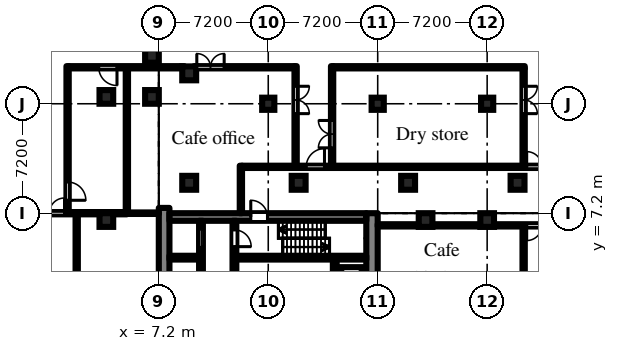
"""IFC4 building model, lengths in metres.
Left out: names, types, materials, properties, quantities, classifications, styles, units other than length and angle.
Written with IfcOpenShell. Run it as: python <this file> out.ifc"""

import sys

from ifc_helpers import new_model, si_unit, direction, frame, frame_2d, origin, origin_2d, place, context, subcontext, project, spatial, rectangle, hollow_circle, extrude, element, fill, save


model = new_model("IFC4")
c1 = context("Model", 3, precision=1e-05, world=origin(), true_north=direction((0.0, 1.0)))
c2 = subcontext(c1, "Body", "Model", "MODEL_VIEW")
j1 = project(units=[si_unit("LENGTHUNIT", "METRE"), si_unit("PLANEANGLEUNIT", "RADIAN")], contexts=[c1])
p1 = place(None, origin())
s1 = spatial("IfcSite", under=j1, at=p1, CompositionType="ELEMENT")
p2 = place(p1, origin())
s2 = spatial("IfcBuilding", under=s1, at=p2, CompositionType="ELEMENT")
p3 = place(p2, origin())
s3 = spatial("IfcBuildingStorey", under=s2, at=p3, CompositionType="ELEMENT", Elevation=0.0)
for number, where, z_axis, x_axis in (
    (1, (3.75, 6.75, 0.0), (0.0, 0.0, 1.0), (1.0, 0.0, 0.0)),
    (2, (3.75, 14.85, 0.0), (0.0, 0.0, 1.0), (1.0, 0.0, 0.0)),
    (3, (6.75, 14.85, 0.0), (0.0, 0.0, 1.0), (1.0, 0.0, 0.0)),
    (4, (6.75, 17.55, 0.0), (0.0, 0.0, 1.0), (1.0, 0.0, 0.0)),
    (5, (24.75, 6.75, 0.0), (0.0, 0.0, 1.0), (1.0, 0.0, 0.0)),
    (6, (28.8, 6.75, 0.0), (0.0, 0.0, 1.0), (1.0, 0.0, 0.0)),
):
    element("IfcColumn", number, at=place(p3, frame(where, z_axis=z_axis, x_axis=x_axis)), inside=s3, PredefinedType="COLUMN", context=c2, shape_type="SweptSolid", body=[
        extrude(rectangle(XDim=0.9, YDim=0.9, at=origin_2d()), origin(), (0.0, 0.0, 1.0), 7.2),
    ])
for number, where, z_axis, x_axis in (
    (7, (14.4, 14.4, 0.0), (0.0, 0.0, 1.0), (1.0, 0.0, 0.0)),
    (8, (21.6, 14.4, 0.0), (0.0, 0.0, 1.0), (1.0, 0.0, 0.0)),
    (9, (28.8, 14.4, 0.0), (0.0, 0.0, 1.0), (1.0, 0.0, 0.0)),
):
    element("IfcColumn", number, at=place(p3, frame(where, z_axis=z_axis, x_axis=x_axis)), inside=s3, PredefinedType="COLUMN", context=c2, shape_type="SweptSolid", body=[
        extrude(rectangle(XDim=0.8, YDim=0.8, at=origin_2d()), origin(), (0.0, 0.0, 1.0), 6.6),
    ])
for number, where, z_axis, x_axis in (
    (10, (30.8, 9.2, 0.0), (0.0, 0.0, 1.0), (1.0, 0.0, 0.0)),
    (11, (23.6, 9.2, 0.0), (0.0, 0.0, 1.0), (1.0, 0.0, 0.0)),
    (12, (16.4, 9.2, 0.0), (0.0, 0.0, 1.0), (1.0, 0.0, 0.0)),
    (13, (9.2, 9.2, 0.0), (0.0, 0.0, 1.0), (1.0, 0.0, 0.0)),
    (14, (9.2, 16.4, 0.0), (0.0, 0.0, 1.0), (1.0, 0.0, 0.0)),
):
    element("IfcColumn", number, at=place(p3, frame(where, z_axis=z_axis, x_axis=x_axis)), inside=s3, PredefinedType="COLUMN", context=c2, shape_type="SweptSolid", body=[
        extrude(hollow_circle(Radius=0.457, WallThickness=0.05, at=origin_2d()), origin(), (0.0, 0.0, 1.0), 7.5),
    ])
p4 = place(p3, frame((7.55, -7.548, 0.0), z_axis=(0.0, 0.0, 1.0), x_axis=(0.0, 1.0, 0.0)))
e15 = element("IfcWall", 15, at=p4, inside=s3, PredefinedType="SHEAR", context=c2, shape_type="SweptSolid", body=[
    extrude(rectangle(XDim=15.096, YDim=0.7, at=frame_2d((7.548, 0.0))), origin(), (0.0, 0.0, 1.0), 6.6),
])
p5 = place(p4, frame((6.348, 0.0, 0.0)))
e16 = element("IfcOpeningElement", 16, at=p5, cuts=e15, PredefinedType="OPENING", context=c2, shape_type="SweptSolid", body=[
    extrude(rectangle(XDim=2.4, YDim=2.2, at=frame_2d((1.2, 1.1))), frame((0.0, 0.36, 0.0), z_axis=(0.0, -1.0, 0.0), x_axis=(1.0, 0.0, 0.0)), (0.0, 0.0, 1.0), 0.72),
])
p6 = place(p3, frame((21.225, -7.2, 0.0), z_axis=(0.0, 0.0, 1.0), x_axis=(0.0, 1.0, 0.0)))
e17 = element("IfcWall", 17, at=p6, inside=s3, PredefinedType="SHEAR", context=c2, shape_type="SweptSolid", body=[
    extrude(rectangle(XDim=14.4, YDim=0.75, at=frame_2d((7.2, 0.0))), origin(), (0.0, 0.0, 1.0), 6.6),
])
p7 = place(p6, frame((6.0, 0.0, 0.0)))
e18 = element("IfcOpeningElement", 18, at=p7, cuts=e17, PredefinedType="OPENING", context=c2, shape_type="SweptSolid", body=[
    extrude(rectangle(XDim=2.4, YDim=2.2, at=frame_2d((1.2, 1.1))), frame((0.0, 0.385, 0.0), z_axis=(0.0, -1.0, 0.0), x_axis=(1.0, 0.0, 0.0)), (0.0, 0.0, 1.0), 0.77),
])
p8 = place(p3, frame((7.9, 6.95, 0.0), z_axis=(0.0, 0.0, 1.0), x_axis=(1.0, 0.0, 0.0)))
e19 = element("IfcWall", 19, at=p8, inside=s3, PredefinedType="SHEAR", context=c2, shape_type="SweptSolid", body=[
    extrude(rectangle(XDim=12.95, YDim=0.5, at=frame_2d((6.475, 0.0))), origin(), (0.0, 0.0, 1.0), 6.6),
])
p9 = place(p8, frame((5.35, 0.0, 0.0)))
e20 = element("IfcOpeningElement", 20, at=p9, cuts=e19, PredefinedType="OPENING", context=c2, shape_type="SweptSolid", body=[
    extrude(rectangle(XDim=1.1, YDim=2.1, at=frame_2d((0.55, 1.05))), frame((0.0, 0.26, 0.0), z_axis=(0.0, -1.0, 0.0), x_axis=(1.0, 0.0, 0.0)), (0.0, 0.0, 1.0), 0.52),
])
p10 = place(p3, frame((7.9, 4.275, 0.0), z_axis=(0.0, 0.0, 1.0), x_axis=(1.0, 0.0, 0.0)))
e21 = element("IfcWall", 21, at=p10, inside=s3, PredefinedType="SHEAR", context=c2, shape_type="SweptSolid", body=[
    extrude(rectangle(XDim=1.95, YDim=0.25, at=frame_2d((0.975, 0.0))), origin(), (0.0, 0.0, 1.0), 6.6),
])
p11 = place(p3, frame((12.3, 4.275, 0.0), z_axis=(0.0, 0.0, 1.0), x_axis=(1.0, 0.0, 0.0)))
e22 = element("IfcWall", 22, at=p11, inside=s3, PredefinedType="SHEAR", context=c2, shape_type="SweptSolid", body=[
    extrude(rectangle(XDim=8.55, YDim=0.25, at=frame_2d((4.275, 0.0))), origin(), (0.0, 0.0, 1.0), 6.6),
])
p12 = place(p3, frame((9.975, 2.05, 0.0), z_axis=(0.0, 0.0, 1.0), x_axis=(0.0, 1.0, 0.0)))
e23 = element("IfcWall", 23, at=p12, inside=s3, PredefinedType="SHEAR", context=c2, shape_type="SweptSolid", body=[
    extrude(rectangle(XDim=4.65, YDim=0.25, at=frame_2d((2.325, 0.0))), origin(), (0.0, 0.0, 1.0), 6.6),
])
p13 = place(p12, frame((2.95, 0.0, 0.0)))
e24 = element("IfcOpeningElement", 24, at=p13, cuts=e23, PredefinedType="OPENING", context=c2, shape_type="SweptSolid", body=[
    extrude(rectangle(XDim=1.1, YDim=2.1, at=frame_2d((0.55, 1.05))), frame((0.0, 0.135, 0.0), z_axis=(0.0, -1.0, 0.0), x_axis=(1.0, 0.0, 0.0)), (0.0, 0.0, 1.0), 0.27),
])
p14 = place(p3, frame((12.175, 2.05, 0.0), z_axis=(0.0, 0.0, 1.0), x_axis=(0.0, 1.0, 0.0)))
e25 = element("IfcWall", 25, at=p14, inside=s3, PredefinedType="SHEAR", context=c2, shape_type="SweptSolid", body=[
    extrude(rectangle(XDim=4.65, YDim=0.25, at=frame_2d((2.325, 0.0))), origin(), (0.0, 0.0, 1.0), 6.6),
])
p15 = place(p14, frame((2.95, 0.0, 0.0)))
e26 = element("IfcOpeningElement", 26, at=p15, cuts=e25, PredefinedType="OPENING", context=c2, shape_type="SweptSolid", body=[
    extrude(rectangle(XDim=1.1, YDim=2.1, at=frame_2d((0.55, 1.05))), frame((0.0, 0.135, 0.0), z_axis=(0.0, -1.0, 0.0), x_axis=(1.0, 0.0, 0.0)), (0.0, 0.0, 1.0), 0.27),
])
p16 = place(p3, frame((18.775, 2.05, 0.0), z_axis=(0.0, 0.0, 1.0), x_axis=(0.0, 1.0, 0.0)))
e27 = element("IfcWall", 27, at=p16, inside=s3, PredefinedType="PARTITIONING", context=c2, shape_type="SweptSolid", body=[
    extrude(rectangle(XDim=2.1, YDim=0.25, at=frame_2d((1.05, 0.0))), origin(), (0.0, 0.0, 1.0), 6.6),
])
p17 = place(p3, frame((-1.8, 7.2, 0.0), z_axis=(0.0, 0.0, 1.0), x_axis=(1.0, 0.0, 0.0)))
e28 = element("IfcWall", 28, at=p17, inside=s3, PredefinedType="PARTITIONING", context=c2, shape_type="SweptSolid", body=[
    extrude(rectangle(XDim=6.9, YDim=0.15, at=frame_2d((3.45, 0.0))), origin(), (0.0, 0.0, 1.0), 6.6),
])
p18 = place(p17, frame((0.8, 0.0, 0.0)))
e29 = element("IfcOpeningElement", 29, at=p18, cuts=e28, PredefinedType="OPENING", context=c2, shape_type="SweptSolid", body=[
    extrude(rectangle(XDim=2.0, YDim=2.1, at=frame_2d((1.0, 1.05))), frame((0.0, 0.085, 0.0), z_axis=(0.0, -1.0, 0.0), x_axis=(1.0, 0.0, 0.0)), (0.0, 0.0, 1.0), 0.17),
])
p19 = place(p3, frame((1.2, 7.275, 0.0), z_axis=(0.0, 0.0, 1.0), x_axis=(0.0, 1.0, 0.0)))
e30 = element("IfcWall", 30, at=p19, inside=s3, PredefinedType="PARTITIONING", context=c2, shape_type="SweptSolid", body=[
    extrude(rectangle(XDim=9.6, YDim=0.15, at=frame_2d((4.8, 0.0))), origin(), (0.0, 0.0, 1.0), 6.6),
])
p20 = place(p19, frame((0.775, 0.0, 0.0)))
e31 = element("IfcOpeningElement", 31, at=p20, cuts=e30, PredefinedType="OPENING", context=c2, shape_type="SweptSolid", body=[
    extrude(rectangle(XDim=1.2, YDim=2.1, at=frame_2d((0.6, 1.05))), frame((0.0, 0.085, 0.0), z_axis=(0.0, -1.0, 0.0), x_axis=(1.0, 0.0, 0.0)), (0.0, 0.0, 1.0), 0.17),
])
p21 = place(p3, frame((1.275, 16.8, 0.0), z_axis=(0.0, 0.0, 1.0), x_axis=(1.0, 0.0, 0.0)))
e32 = element("IfcWall", 32, at=p21, inside=s3, PredefinedType="PARTITIONING", context=c2, shape_type="SweptSolid", body=[
    extrude(rectangle(XDim=7.604, YDim=0.15, at=frame_2d((3.802, 0.0))), origin(), (0.0, 0.0, 1.0), 6.6),
])
p22 = place(p21, frame((1.975, 0.0, 0.0)))
e33 = element("IfcOpeningElement", 33, at=p22, cuts=e32, PredefinedType="OPENING", context=c2, shape_type="SweptSolid", body=[
    extrude(rectangle(XDim=1.2, YDim=2.1, at=frame_2d((0.6, 1.05))), frame((0.0, 0.085, 0.0), z_axis=(0.0, -1.0, 0.0), x_axis=(1.0, 0.0, 0.0)), (0.0, 0.0, 1.0), 0.17),
])
p23 = place(p3, frame((9.521, 16.8, 0.0), z_axis=(0.0, 0.0, 1.0), x_axis=(1.0, 0.0, 0.0)))
e34 = element("IfcWall", 34, at=p23, inside=s3, PredefinedType="PARTITIONING", context=c2, shape_type="SweptSolid", body=[
    extrude(rectangle(XDim=6.604, YDim=0.15, at=frame_2d((3.302, 0.0))), origin(), (0.0, 0.0, 1.0), 6.6),
])
p24 = place(p23, frame((0.178, 0.0, 0.0)))
e35 = element("IfcOpeningElement", 35, at=p24, cuts=e34, PredefinedType="OPENING", context=c2, shape_type="SweptSolid", body=[
    extrude(rectangle(XDim=1.8, YDim=2.1, at=frame_2d((0.9, 1.05))), frame((0.0, 0.085, 0.0), z_axis=(0.0, -1.0, 0.0), x_axis=(1.0, 0.0, 0.0)), (0.0, 0.0, 1.0), 0.17),
])
p25 = place(p3, frame((1.8, 1.725, 0.0), z_axis=(0.0, 0.0, 1.0), x_axis=(0.0, 1.0, 0.0)))
e36 = element("IfcWall", 36, at=p25, inside=s3, PredefinedType="PARTITIONING", context=c2, shape_type="SweptSolid", body=[
    extrude(rectangle(XDim=5.4, YDim=0.15, at=frame_2d((2.7, 0.0))), origin(), (0.0, 0.0, 1.0), 6.6),
])
p26 = place(p25, frame((0.175, 0.0, 0.0)))
e37 = element("IfcOpeningElement", 37, at=p26, cuts=e36, PredefinedType="OPENING", context=c2, shape_type="SweptSolid", body=[
    extrude(rectangle(XDim=0.9, YDim=2.1, at=frame_2d((0.45, 1.05))), frame((0.0, 0.085, 0.0), z_axis=(0.0, -1.0, 0.0), x_axis=(1.0, 0.0, 0.0)), (0.0, 0.0, 1.0), 0.17),
])
p27 = place(p3, frame((5.1, 7.275, 0.0), z_axis=(0.0, 0.0, 1.0), x_axis=(0.0, 1.0, 0.0)))
e38 = element("IfcWall", 38, at=p27, inside=s3, PredefinedType="PARTITIONING", context=c2, shape_type="SweptSolid", body=[
    extrude(rectangle(XDim=9.45, YDim=0.15, at=frame_2d((4.725, 0.0))), origin(), (0.0, 0.0, 1.0), 6.6),
])
p28 = place(p3, frame((5.1, 7.2, 0.0), z_axis=(0.0, 0.0, 1.0), x_axis=(1.0, 0.0, 0.0)))
e39 = element("IfcWall", 39, at=p28, inside=s3, PredefinedType="PARTITIONING", context=c2, shape_type="SweptSolid", body=[
    extrude(rectangle(XDim=2.1, YDim=0.1, at=frame_2d((1.05, 0.0))), origin(), (0.0, 0.0, 1.0), 6.6),
])
p29 = place(p3, frame((12.6, 7.2, 0.0), z_axis=(0.0, 0.0, 1.0), x_axis=(0.0, 1.0, 0.0)))
e40 = element("IfcWall", 40, at=p29, inside=s3, PredefinedType="PARTITIONING", context=c2, shape_type="SweptSolid", body=[
    extrude(rectangle(XDim=3.125, YDim=0.15, at=frame_2d((1.562, 0.0))), origin(), (0.0, 0.0, 1.0), 6.6),
])
p30 = place(p3, frame((12.675, 10.25, 0.0), z_axis=(0.0, 0.0, 1.0), x_axis=(1.0, 0.0, 0.0)))
e41 = element("IfcWall", 41, at=p30, inside=s3, PredefinedType="PARTITIONING", context=c2, shape_type="SweptSolid", body=[
    extrude(rectangle(XDim=37.545, YDim=0.15, at=frame_2d((18.772, 0.0))), origin(), (0.0, 0.0, 1.0), 6.6),
])
p31 = place(p30, frame((4.225, 0.0, 0.0)))
e42 = element("IfcOpeningElement", 42, at=p31, cuts=e41, PredefinedType="OPENING", context=c2, shape_type="SweptSolid", body=[
    extrude(rectangle(XDim=1.2, YDim=2.1, at=frame_2d((0.6, 1.05))), frame((0.0, 0.085, 0.0), z_axis=(0.0, -1.0, 0.0), x_axis=(1.0, 0.0, 0.0)), (0.0, 0.0, 1.0), 0.17),
])
p32 = place(p30, frame((18.725, 0.0, 0.0)))
e43 = element("IfcOpeningElement", 43, at=p32, cuts=e41, PredefinedType="OPENING", context=c2, shape_type="SweptSolid", body=[
    extrude(rectangle(XDim=2.0, YDim=2.1, at=frame_2d((1.0, 1.05))), frame((0.0, 0.085, 0.0), z_axis=(0.0, -1.0, 0.0), x_axis=(1.0, 0.0, 0.0)), (0.0, 0.0, 1.0), 0.17),
])
p33 = place(p3, frame((16.2, 10.325, 0.0), z_axis=(0.0, 0.0, 1.0), x_axis=(0.0, 1.0, 0.0)))
e44 = element("IfcWall", 44, at=p33, inside=s3, PredefinedType="PARTITIONING", context=c2, shape_type="SweptSolid", body=[
    extrude(rectangle(XDim=6.55, YDim=0.15, at=frame_2d((3.275, 0.0))), origin(), (0.0, 0.0, 1.0), 6.6),
])
p34 = place(p33, frame((3.425, 0.0, 0.0)))
e45 = element("IfcOpeningElement", 45, at=p34, cuts=e44, PredefinedType="OPENING", context=c2, shape_type="SweptSolid", body=[
    extrude(rectangle(XDim=1.8, YDim=2.1, at=frame_2d((0.9, 1.05))), frame((0.0, 0.085, 0.0), z_axis=(0.0, -1.0, 0.0), x_axis=(1.0, 0.0, 0.0)), (0.0, 0.0, 1.0), 0.17),
])
p35 = place(p3, frame((18.6, 10.325, 0.0), z_axis=(0.0, 0.0, 1.0), x_axis=(0.0, 1.0, 0.0)))
e46 = element("IfcWall", 46, at=p35, inside=s3, PredefinedType="PARTITIONING", context=c2, shape_type="SweptSolid", body=[
    extrude(rectangle(XDim=6.55, YDim=0.15, at=frame_2d((3.275, 0.0))), origin(), (0.0, 0.0, 1.0), 6.6),
])
p36 = place(p35, frame((1.175, 0.0, 0.0)))
e47 = element("IfcOpeningElement", 47, at=p36, cuts=e46, PredefinedType="OPENING", context=c2, shape_type="SweptSolid", body=[
    extrude(rectangle(XDim=1.8, YDim=2.1, at=frame_2d((0.9, 1.05))), frame((0.0, 0.085, 0.0), z_axis=(0.0, -1.0, 0.0), x_axis=(1.0, 0.0, 0.0)), (0.0, 0.0, 1.0), 0.17),
])
p37 = place(p3, frame((18.675, 16.8, 0.0), z_axis=(0.0, 0.0, 1.0), x_axis=(1.0, 0.0, 0.0)))
e48 = element("IfcWall", 48, at=p37, inside=s3, PredefinedType="PARTITIONING", context=c2, shape_type="SweptSolid", body=[
    extrude(rectangle(XDim=12.6, YDim=0.15, at=frame_2d((6.3, 0.0))), origin(), (0.0, 0.0, 1.0), 6.6),
])
p38 = place(p3, frame((21.6, 6.4, 0.0), z_axis=(0.0, 0.0, 1.0), x_axis=(1.0, 0.0, 0.0)))
e49 = element("IfcWall", 49, at=p38, inside=s3, PredefinedType="PARTITIONING", context=c2, shape_type="SweptSolid", body=[
    extrude(rectangle(XDim=28.62, YDim=0.15, at=frame_2d((14.31, 0.0))), origin(), (0.0, 0.0, 1.0), 6.6),
])
p39 = place(p38, frame((9.8, 0.0, 0.0)))
e50 = element("IfcOpeningElement", 50, at=p39, cuts=e49, PredefinedType="OPENING", context=c2, shape_type="SweptSolid", body=[
    extrude(rectangle(XDim=2.0, YDim=2.1, at=frame_2d((1.0, 1.05))), frame((0.0, 0.085, 0.0), z_axis=(0.0, -1.0, 0.0), x_axis=(1.0, 0.0, 0.0)), (0.0, 0.0, 1.0), 0.17),
])
p40 = place(p3, frame((31.2, -6.325, 0.0), z_axis=(0.0, 0.0, 1.0), x_axis=(0.0, 1.0, 0.0)))
e51 = element("IfcWall", 51, at=p40, inside=s3, PredefinedType="PARTITIONING", context=c2, shape_type="SweptSolid", body=[
    extrude(rectangle(XDim=12.65, YDim=0.15, at=frame_2d((6.325, 0.0))), origin(), (0.0, 0.0, 1.0), 6.6),
])
p41 = place(p40, frame((5.325, 0.0, 0.0)))
e52 = element("IfcOpeningElement", 52, at=p41, cuts=e51, PredefinedType="OPENING", context=c2, shape_type="SweptSolid", body=[
    extrude(rectangle(XDim=2.0, YDim=2.1, at=frame_2d((1.0, 1.05))), frame((0.0, 0.085, 0.0), z_axis=(0.0, -1.0, 0.0), x_axis=(1.0, 0.0, 0.0)), (0.0, 0.0, 1.0), 0.17),
])
p42 = place(p40, frame((8.175, 0.0, 0.0)))
e53 = element("IfcOpeningElement", 53, at=p42, cuts=e51, PredefinedType="OPENING", context=c2, shape_type="SweptSolid", body=[
    extrude(rectangle(XDim=0.9, YDim=2.1, at=frame_2d((0.45, 1.05))), frame((0.0, 0.085, 0.0), z_axis=(0.0, -1.0, 0.0), x_axis=(1.0, 0.0, 0.0)), (0.0, 0.0, 1.0), 0.17),
])
p43 = place(p40, frame((2.675, 0.0, 0.0)))
e54 = element("IfcOpeningElement", 54, at=p43, cuts=e51, PredefinedType="OPENING", context=c2, shape_type="SweptSolid", body=[
    extrude(rectangle(XDim=1.8, YDim=2.1, at=frame_2d((0.9, 1.05))), frame((0.0, 0.085, 0.0), z_axis=(0.0, -1.0, 0.0), x_axis=(1.0, 0.0, 0.0)), (0.0, 0.0, 1.0), 0.17),
])
p44 = place(p3, frame((31.2, 10.325, 0.0), z_axis=(0.0, 0.0, 1.0), x_axis=(0.0, 1.0, 0.0)))
e55 = element("IfcWall", 55, at=p44, inside=s3, PredefinedType="PARTITIONING", context=c2, shape_type="SweptSolid", body=[
    extrude(rectangle(XDim=6.4, YDim=0.15, at=frame_2d((3.2, 0.0))), origin(), (0.0, 0.0, 1.0), 6.6),
])
p45 = place(p44, frame((3.425, 0.0, 0.0)))
e56 = element("IfcOpeningElement", 56, at=p45, cuts=e55, PredefinedType="OPENING", context=c2, shape_type="SweptSolid", body=[
    extrude(rectangle(XDim=1.8, YDim=2.1, at=frame_2d((0.9, 1.05))), frame((0.0, 0.085, 0.0), z_axis=(0.0, -1.0, 0.0), x_axis=(1.0, 0.0, 0.0)), (0.0, 0.0, 1.0), 0.17),
])
p46 = place(p13, origin())
e57 = element("IfcDoor", 57, at=p46, inside=s3, OperationType="SLIDING_TO_LEFT", PredefinedType="DOOR", context=c2, shape_type="SweptSolid", body=[
    extrude(rectangle(XDim=1.1, YDim=2.1, at=frame_2d((0.55, 1.05))), frame((0.0, 0.025, 0.0), z_axis=(0.0, -1.0, 0.0), x_axis=(1.0, 0.0, 0.0)), (0.0, 0.0, 1.0), 0.05),
])
fill(e24, e57)
p47 = place(p15, frame((1.1, 0.0, 0.0), z_axis=(0.0, 0.0, 1.0), x_axis=(-1.0, 0.0, 0.0)))
e58 = element("IfcDoor", 58, at=p47, inside=s3, OperationType="SINGLE_SWING_RIGHT", PredefinedType="DOOR", context=c2, shape_type="SweptSolid", body=[
    extrude(rectangle(XDim=1.1, YDim=2.1, at=frame_2d((0.55, 1.05))), frame((0.0, 0.025, 0.0), z_axis=(0.0, -1.0, 0.0), x_axis=(1.0, 0.0, 0.0)), (0.0, 0.0, 1.0), 0.05),
])
fill(e26, e58)
p48 = place(p9, origin())
e59 = element("IfcDoor", 59, at=p48, inside=s3, OperationType="SINGLE_SWING_LEFT", PredefinedType="DOOR", context=c2, shape_type="SweptSolid", body=[
    extrude(rectangle(XDim=1.1, YDim=2.1, at=frame_2d((0.55, 1.05))), frame((0.0, 0.025, 0.0), z_axis=(0.0, -1.0, 0.0), x_axis=(1.0, 0.0, 0.0)), (0.0, 0.0, 1.0), 0.05),
])
fill(e20, e59)
p49 = place(p18, origin())
e60 = element("IfcDoor", 60, at=p49, inside=s3, OperationType="DOUBLE_DOOR_DOUBLE_SWING", PredefinedType="DOOR", context=c2, shape_type="SweptSolid", body=[
    extrude(rectangle(XDim=2.0, YDim=2.1, at=frame_2d((1.0, 1.05))), frame((0.0, 0.025, 0.0), z_axis=(0.0, -1.0, 0.0), x_axis=(1.0, 0.0, 0.0)), (0.0, 0.0, 1.0), 0.05),
])
fill(e29, e60)
p50 = place(p31, origin())
e61 = element("IfcDoor", 61, at=p50, inside=s3, OperationType="SINGLE_SWING_RIGHT", PredefinedType="DOOR", context=c2, shape_type="SweptSolid", body=[
    extrude(rectangle(XDim=1.2, YDim=2.1, at=frame_2d((0.6, 1.05))), frame((0.0, 0.025, 0.0), z_axis=(0.0, -1.0, 0.0), x_axis=(1.0, 0.0, 0.0)), (0.0, 0.0, 1.0), 0.05),
])
fill(e42, e61)
p51 = place(p39, frame((2.0, 0.0, 0.0), z_axis=(0.0, 0.0, 1.0), x_axis=(-1.0, 0.0, 0.0)))
e62 = element("IfcDoor", 62, at=p51, inside=s3, OperationType="DOUBLE_DOOR_DOUBLE_SWING", PredefinedType="DOOR", context=c2, shape_type="SweptSolid", body=[
    extrude(rectangle(XDim=2.0, YDim=2.1, at=frame_2d((1.0, 1.05))), frame((0.0, 0.025, 0.0), z_axis=(0.0, -1.0, 0.0), x_axis=(1.0, 0.0, 0.0)), (0.0, 0.0, 1.0), 0.05),
])
fill(e50, e62)
p52 = place(p32, origin())
e63 = element("IfcDoor", 63, at=p52, inside=s3, OperationType="DOUBLE_DOOR_DOUBLE_SWING", PredefinedType="DOOR", context=c2, shape_type="SweptSolid", body=[
    extrude(rectangle(XDim=2.0, YDim=2.1, at=frame_2d((1.0, 1.05))), frame((0.0, 0.025, 0.0), z_axis=(0.0, -1.0, 0.0), x_axis=(1.0, 0.0, 0.0)), (0.0, 0.0, 1.0), 0.05),
])
fill(e43, e63)
p53 = place(p20, frame((1.2, 0.0, 0.0), z_axis=(0.0, 0.0, 1.0), x_axis=(-1.0, 0.0, 0.0)))
e64 = element("IfcDoor", 64, at=p53, inside=s3, OperationType="SINGLE_SWING_RIGHT", PredefinedType="DOOR", context=c2, shape_type="SweptSolid", body=[
    extrude(rectangle(XDim=1.2, YDim=2.1, at=frame_2d((0.6, 1.05))), frame((0.0, 0.025, 0.0), z_axis=(0.0, -1.0, 0.0), x_axis=(1.0, 0.0, 0.0)), (0.0, 0.0, 1.0), 0.05),
])
fill(e31, e64)
p54 = place(p22, frame((1.2, 0.0, 0.0), z_axis=(0.0, 0.0, 1.0), x_axis=(-1.0, 0.0, 0.0)))
e65 = element("IfcDoor", 65, at=p54, inside=s3, OperationType="SINGLE_SWING_LEFT", PredefinedType="DOOR", context=c2, shape_type="SweptSolid", body=[
    extrude(rectangle(XDim=1.2, YDim=2.1, at=frame_2d((0.6, 1.05))), frame((0.0, 0.025, 0.0), z_axis=(0.0, -1.0, 0.0), x_axis=(1.0, 0.0, 0.0)), (0.0, 0.0, 1.0), 0.05),
])
fill(e33, e65)
p55 = place(p24, origin())
e66 = element("IfcDoor", 66, at=p55, inside=s3, OperationType="DOUBLE_DOOR_DOUBLE_SWING", PredefinedType="DOOR", context=c2, shape_type="SweptSolid", body=[
    extrude(rectangle(XDim=1.8, YDim=2.1, at=frame_2d((0.9, 1.05))), frame((0.0, 0.025, 0.0), z_axis=(0.0, -1.0, 0.0), x_axis=(1.0, 0.0, 0.0)), (0.0, 0.0, 1.0), 0.05),
])
fill(e35, e66)
p56 = place(p34, frame((1.8, 0.0, 0.0), z_axis=(0.0, 0.0, 1.0), x_axis=(-1.0, 0.0, 0.0)))
e67 = element("IfcDoor", 67, at=p56, inside=s3, OperationType="DOUBLE_DOOR_DOUBLE_SWING", PredefinedType="DOOR", context=c2, shape_type="SweptSolid", body=[
    extrude(rectangle(XDim=1.8, YDim=2.1, at=frame_2d((0.9, 1.05))), frame((0.0, 0.025, 0.0), z_axis=(0.0, -1.0, 0.0), x_axis=(1.0, 0.0, 0.0)), (0.0, 0.0, 1.0), 0.05),
])
fill(e45, e67)
p57 = place(p36, origin())
e68 = element("IfcDoor", 68, at=p57, inside=s3, OperationType="DOUBLE_DOOR_DOUBLE_SWING", PredefinedType="DOOR", context=c2, shape_type="SweptSolid", body=[
    extrude(rectangle(XDim=1.8, YDim=2.1, at=frame_2d((0.9, 1.05))), frame((0.0, 0.025, 0.0), z_axis=(0.0, -1.0, 0.0), x_axis=(1.0, 0.0, 0.0)), (0.0, 0.0, 1.0), 0.05),
])
fill(e47, e68)
p58 = place(p45, frame((1.8, 0.0, 0.0), z_axis=(0.0, 0.0, 1.0), x_axis=(-1.0, 0.0, 0.0)))
e69 = element("IfcDoor", 69, at=p58, inside=s3, OperationType="DOUBLE_DOOR_DOUBLE_SWING", PredefinedType="DOOR", context=c2, shape_type="SweptSolid", body=[
    extrude(rectangle(XDim=1.8, YDim=2.1, at=frame_2d((0.9, 1.05))), frame((0.0, 0.025, 0.0), z_axis=(0.0, -1.0, 0.0), x_axis=(1.0, 0.0, 0.0)), (0.0, 0.0, 1.0), 0.05),
])
fill(e56, e69)
save(model, sys.argv[1])
